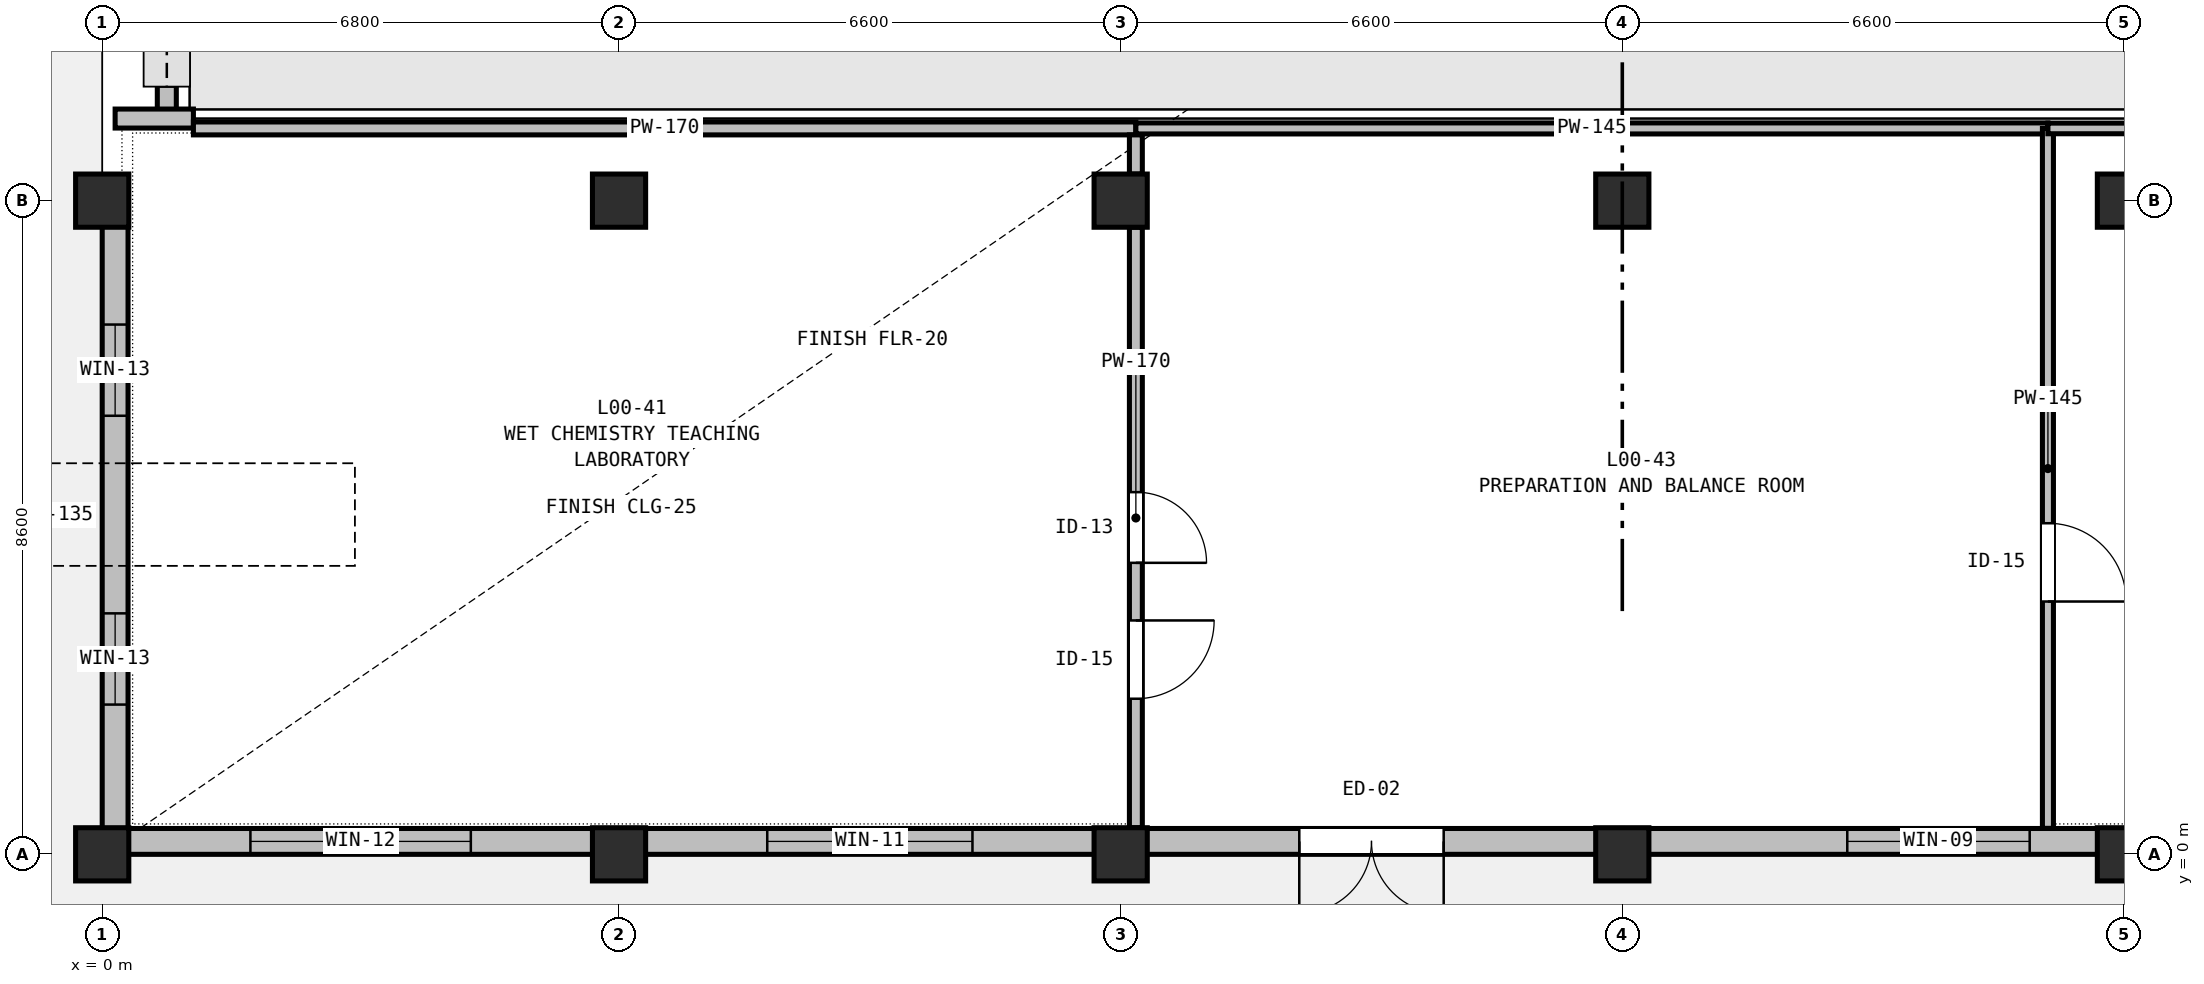
"""IFC4 building model, lengths in metres.
Left out: names, types, materials, properties, quantities, classifications, styles, units other than length and angle.
Written with IfcOpenShell. Run it as: python <this file> out.ifc"""

import sys

from ifc_helpers import new_model, si_unit, direction, frame, frame_2d, origin, origin_2d, place, context, subcontext, project, spatial, rectangle, extrude, element, fill, save


model = new_model("IFC4")
c1 = context("Model", 3, precision=1e-05, world=origin(), true_north=direction((0.0, 1.0)))
c2 = subcontext(c1, "Body", "Model", "MODEL_VIEW")
j1 = project(units=[si_unit("LENGTHUNIT", "METRE"), si_unit("PLANEANGLEUNIT", "RADIAN")], contexts=[c1])
p1 = place(None, origin())
s1 = spatial("IfcSite", under=j1, at=p1, CompositionType="ELEMENT")
p2 = place(p1, origin())
s2 = spatial("IfcBuilding", under=s1, at=p2, CompositionType="ELEMENT")
p3 = place(p2, origin())
s3 = spatial("IfcBuildingStorey", under=s2, at=p3, CompositionType="ELEMENT", Elevation=0.0)
p4 = place(p3, frame((0.0, 0.0, -0.32), z_axis=(0.0, 0.0, 1.0), x_axis=(1.0, 0.0, 0.0)))
e1 = element("IfcColumn", 1, at=p4, inside=s3, PredefinedType="COLUMN", context=c2, shape_type="SweptSolid", body=[
    extrude(rectangle(XDim=0.7, YDim=0.7, at=origin_2d()), origin(), (0.0, 0.0, 1.0), 5.66),
])
p5 = place(p3, frame((0.0, 8.6, -0.32), z_axis=(0.0, 0.0, 1.0), x_axis=(1.0, 0.0, 0.0)))
e2 = element("IfcColumn", 2, at=p5, inside=s3, PredefinedType="COLUMN", context=c2, shape_type="SweptSolid", body=[
    extrude(rectangle(XDim=0.7, YDim=0.7, at=origin_2d()), origin(), (0.0, 0.0, 1.0), 5.72),
])
p6 = place(p3, frame((6.8, 0.0, -0.32), z_axis=(0.0, 0.0, 1.0), x_axis=(1.0, 0.0, 0.0)))
e3 = element("IfcColumn", 3, at=p6, inside=s3, PredefinedType="COLUMN", context=c2, shape_type="SweptSolid", body=[
    extrude(rectangle(XDim=0.7, YDim=0.7, at=origin_2d()), origin(), (0.0, 0.0, 1.0), 5.66),
])
p7 = place(p3, frame((6.8, 8.6, -0.32), z_axis=(0.0, 0.0, 1.0), x_axis=(1.0, 0.0, 0.0)))
e4 = element("IfcColumn", 4, at=p7, inside=s3, PredefinedType="COLUMN", context=c2, shape_type="SweptSolid", body=[
    extrude(rectangle(XDim=0.7, YDim=0.7, at=origin_2d()), origin(), (0.0, 0.0, 1.0), 5.72),
])
p8 = place(p3, frame((13.4, 0.0, -0.32), z_axis=(0.0, 0.0, 1.0), x_axis=(1.0, 0.0, 0.0)))
e5 = element("IfcColumn", 5, at=p8, inside=s3, PredefinedType="COLUMN", context=c2, shape_type="SweptSolid", body=[
    extrude(rectangle(XDim=0.7, YDim=0.7, at=origin_2d()), origin(), (0.0, 0.0, 1.0), 5.66),
])
p9 = place(p3, frame((13.4, 8.6, -0.32), z_axis=(0.0, 0.0, 1.0), x_axis=(1.0, 0.0, 0.0)))
e6 = element("IfcColumn", 6, at=p9, inside=s3, PredefinedType="COLUMN", context=c2, shape_type="SweptSolid", body=[
    extrude(rectangle(XDim=0.7, YDim=0.7, at=origin_2d()), origin(), (0.0, 0.0, 1.0), 5.72),
])
p10 = place(p3, frame((20.0, 0.0, -0.32), z_axis=(0.0, 0.0, 1.0), x_axis=(1.0, 0.0, 0.0)))
e7 = element("IfcColumn", 7, at=p10, inside=s3, PredefinedType="COLUMN", context=c2, shape_type="SweptSolid", body=[
    extrude(rectangle(XDim=0.7, YDim=0.7, at=origin_2d()), origin(), (0.0, 0.0, 1.0), 5.66),
])
p11 = place(p3, frame((20.0, 8.6, -0.32), z_axis=(0.0, 0.0, 1.0), x_axis=(1.0, 0.0, 0.0)))
e8 = element("IfcColumn", 8, at=p11, inside=s3, PredefinedType="COLUMN", context=c2, shape_type="SweptSolid", body=[
    extrude(rectangle(XDim=0.7, YDim=0.7, at=origin_2d()), origin(), (0.0, 0.0, 1.0), 5.72),
])
p12 = place(p3, frame((26.6, 0.0, -0.32), z_axis=(0.0, 0.0, 1.0), x_axis=(1.0, 0.0, 0.0)))
e9 = element("IfcColumn", 9, at=p12, inside=s3, PredefinedType="COLUMN", context=c2, shape_type="SweptSolid", body=[
    extrude(rectangle(XDim=0.7, YDim=0.7, at=origin_2d()), origin(), (0.0, 0.0, 1.0), 5.66),
])
p13 = place(p3, frame((26.6, 8.6, -0.32), z_axis=(0.0, 0.0, 1.0), x_axis=(1.0, 0.0, 0.0)))
e10 = element("IfcColumn", 10, at=p13, inside=s3, PredefinedType="COLUMN", context=c2, shape_type="SweptSolid", body=[
    extrude(rectangle(XDim=0.7, YDim=0.7, at=origin_2d()), origin(), (0.0, 0.0, 1.0), 5.72),
])
p14 = place(p3, frame((26.6, 0.17, 0.0), z_axis=(0.0, 0.0, 1.0), x_axis=(-1.0, 0.0, 0.0)))
e11 = element("IfcWall", 11, at=p14, inside=s3, PredefinedType="STANDARD", context=c2, shape_type="SweptSolid", body=[
    extrude(rectangle(XDim=6.6, YDim=0.34, at=frame_2d((3.3, 0.0))), origin(), (0.0, 0.0, 1.0), 4.535),
])
p15 = place(p14, frame((1.24, 0.0, 0.9)))
e12 = element("IfcOpeningElement", 12, at=p15, cuts=e11, PredefinedType="OPENING", context=c2, shape_type="SweptSolid", body=[
    extrude(rectangle(XDim=2.4, YDim=2.1, at=frame_2d((1.2, 1.05))), frame((0.0, 0.18, 0.0), z_axis=(0.0, -1.0, 0.0), x_axis=(1.0, 0.0, 0.0)), (0.0, 0.0, 1.0), 0.36),
])
p16 = place(p3, frame((20.0, 0.17, 0.0), z_axis=(0.0, 0.0, 1.0), x_axis=(-1.0, 0.0, 0.0)))
e13 = element("IfcWall", 13, at=p16, inside=s3, PredefinedType="STANDARD", context=c2, shape_type="SweptSolid", body=[
    extrude(rectangle(XDim=6.6, YDim=0.34, at=frame_2d((3.3, 0.0))), origin(), (0.0, 0.0, 1.0), 4.535),
])
p17 = place(p16, frame((2.35, 0.0, 0.0)))
e14 = element("IfcOpeningElement", 14, at=p17, cuts=e13, PredefinedType="OPENING", context=c2, shape_type="SweptSolid", body=[
    extrude(rectangle(XDim=1.9, YDim=2.3, at=frame_2d((0.95, 1.15))), frame((0.0, 0.18, 0.0), z_axis=(0.0, -1.0, 0.0), x_axis=(1.0, 0.0, 0.0)), (0.0, 0.0, 1.0), 0.36),
])
p18 = place(p3, frame((13.4, 0.17, 0.0), z_axis=(0.0, 0.0, 1.0), x_axis=(-1.0, 0.0, 0.0)))
e15 = element("IfcWall", 15, at=p18, inside=s3, PredefinedType="STANDARD", context=c2, shape_type="SweptSolid", body=[
    extrude(rectangle(XDim=6.6, YDim=0.34, at=frame_2d((3.3, 0.0))), origin(), (0.0, 0.0, 1.0), 4.535),
])
p19 = place(p18, frame((1.95, 0.0, 0.75)))
e16 = element("IfcOpeningElement", 16, at=p19, cuts=e15, PredefinedType="OPENING", context=c2, shape_type="SweptSolid", body=[
    extrude(rectangle(XDim=2.7, YDim=2.2, at=frame_2d((1.35, 1.1))), frame((0.0, 0.18, 0.0), z_axis=(0.0, -1.0, 0.0), x_axis=(1.0, 0.0, 0.0)), (0.0, 0.0, 1.0), 0.36),
])
p20 = place(p3, frame((6.8, 0.17, 0.0), z_axis=(0.0, 0.0, 1.0), x_axis=(-1.0, 0.0, 0.0)))
e17 = element("IfcWall", 17, at=p20, inside=s3, PredefinedType="STANDARD", context=c2, shape_type="SweptSolid", body=[
    extrude(rectangle(XDim=6.8, YDim=0.34, at=frame_2d((3.4, 0.0))), origin(), (0.0, 0.0, 1.0), 4.535),
])
p21 = place(p20, frame((1.95, 0.0, 0.75)))
e18 = element("IfcOpeningElement", 18, at=p21, cuts=e17, PredefinedType="OPENING", context=c2, shape_type="SweptSolid", body=[
    extrude(rectangle(XDim=2.9, YDim=2.2, at=frame_2d((1.45, 1.1))), frame((0.0, 0.18, 0.0), z_axis=(0.0, -1.0, 0.0), x_axis=(1.0, 0.0, 0.0)), (0.0, 0.0, 1.0), 0.36),
])
p22 = place(p3, frame((0.17, 0.34, 0.0), z_axis=(0.0, 0.0, 1.0), x_axis=(0.0, 1.0, 0.0)))
e19 = element("IfcWall", 19, at=p22, inside=s3, PredefinedType="STANDARD", context=c2, shape_type="SweptSolid", body=[
    extrude(rectangle(XDim=8.26, YDim=0.34, at=frame_2d((4.13, 0.0))), origin(), (0.0, 0.0, 1.0), 4.685),
])
p23 = place(p22, frame((1.63, 0.0, 0.9)))
e20 = element("IfcOpeningElement", 20, at=p23, cuts=e19, PredefinedType="OPENING", context=c2, shape_type="SweptSolid", body=[
    extrude(rectangle(XDim=1.2, YDim=1.5, at=frame_2d((0.6, 0.75))), frame((0.0, 0.18, 0.0), z_axis=(0.0, -1.0, 0.0), x_axis=(1.0, 0.0, 0.0)), (0.0, 0.0, 1.0), 0.36),
])
p24 = place(p22, frame((5.43, 0.0, 0.9)))
e21 = element("IfcOpeningElement", 21, at=p24, cuts=e19, PredefinedType="OPENING", context=c2, shape_type="SweptSolid", body=[
    extrude(rectangle(XDim=1.2, YDim=1.5, at=frame_2d((0.6, 0.75))), frame((0.0, 0.18, 0.0), z_axis=(0.0, -1.0, 0.0), x_axis=(1.0, 0.0, 0.0)), (0.0, 0.0, 1.0), 0.36),
])
p25 = place(p3, frame((0.85, 15.92, 0.0), z_axis=(0.0, 0.0, 1.0), x_axis=(0.0, -1.0, 0.0)))
e22 = element("IfcWall", 22, at=p25, inside=s3, PredefinedType="STANDARD", context=c2, shape_type="SweptSolid", body=[
    extrude(rectangle(XDim=6.24, YDim=0.25, at=frame_2d((3.12, 0.0))), origin(), (0.0, 0.0, 1.0), 4.45),
])
p26 = place(p25, frame((0.42, 0.0, 0.0)))
e23 = element("IfcOpeningElement", 23, at=p26, cuts=e22, PredefinedType="OPENING", context=c2, shape_type="SweptSolid", body=[
    extrude(rectangle(XDim=5.4, YDim=3.8, at=frame_2d((2.7, 1.9))), frame((0.0, 0.135, 0.0), z_axis=(0.0, -1.0, 0.0), x_axis=(1.0, 0.0, 0.0)), (0.0, 0.0, 1.0), 0.27),
])
p27 = place(p3, frame((0.17, 9.68, 0.0), z_axis=(0.0, 0.0, 1.0), x_axis=(1.0, 0.0, 0.0)))
e24 = element("IfcWall", 24, at=p27, inside=s3, PredefinedType="STANDARD", context=c2, shape_type="SweptSolid", body=[
    extrude(rectangle(XDim=1.03, YDim=0.25, at=frame_2d((0.515, 0.0))), origin(), (0.0, 0.0, 1.0), 4.45),
])
p28 = place(p3, frame((1.2, 9.55, 0.0), z_axis=(0.0, 0.0, 1.0), x_axis=(1.0, 0.0, 0.0)))
e25 = element("IfcWall", 25, at=p28, inside=s3, PredefinedType="PARTITIONING", context=c2, shape_type="SweptSolid", body=[
    extrude(rectangle(XDim=12.4, YDim=0.17, at=frame_2d((6.2, 0.0))), origin(), (0.0, 0.0, 1.0), 4.535),
])
p29 = place(p3, frame((13.6, 9.465, 0.0), z_axis=(0.0, 0.0, 1.0), x_axis=(0.0, -1.0, 0.0)))
e26 = element("IfcWall", 26, at=p29, inside=s3, PredefinedType="PARTITIONING", context=c2, shape_type="SweptSolid", body=[
    extrude(rectangle(XDim=0.515, YDim=0.17, at=frame_2d((0.258, 0.0))), origin(), (0.0, 0.0, 1.0), 4.535),
])
p30 = place(p3, frame((13.6, 8.25, 0.0), z_axis=(0.0, 0.0, 1.0), x_axis=(0.0, -1.0, 0.0)))
e27 = element("IfcWall", 27, at=p30, inside=s3, PredefinedType="PARTITIONING", context=c2, shape_type="SweptSolid", body=[
    extrude(rectangle(XDim=7.9, YDim=0.17, at=frame_2d((3.95, 0.0))), origin(), (0.0, 0.0, 1.0), 4.535),
])
p31 = place(p30, frame((3.485, 0.0, 0.0)))
e28 = element("IfcOpeningElement", 28, at=p31, cuts=e27, PredefinedType="OPENING", context=c2, shape_type="SweptSolid", body=[
    extrude(rectangle(XDim=0.93, YDim=2.1, at=frame_2d((0.465, 1.05))), frame((0.0, 0.095, 0.0), z_axis=(0.0, -1.0, 0.0), x_axis=(1.0, 0.0, 0.0)), (0.0, 0.0, 1.0), 0.19),
])
p32 = place(p30, frame((5.173, 0.0, 0.0)))
e29 = element("IfcOpeningElement", 29, at=p32, cuts=e27, PredefinedType="OPENING", context=c2, shape_type="SweptSolid", body=[
    extrude(rectangle(XDim=1.03, YDim=2.1, at=frame_2d((0.515, 1.05))), frame((0.0, 0.095, 0.0), z_axis=(0.0, -1.0, 0.0), x_axis=(1.0, 0.0, 0.0)), (0.0, 0.0, 1.0), 0.19),
])
p33 = place(p3, frame((13.6, 9.55, 0.0), z_axis=(0.0, 0.0, 1.0), x_axis=(1.0, 0.0, 0.0)))
e30 = element("IfcWall", 30, at=p33, inside=s3, PredefinedType="PARTITIONING", context=c2, shape_type="SweptSolid", body=[
    extrude(rectangle(XDim=12.0, YDim=0.145, at=frame_2d((6.0, 0.0))), origin(), (0.0, 0.0, 1.0), 4.535),
])
p34 = place(p3, frame((25.6, 9.55, 0.0), z_axis=(0.0, 0.0, 1.0), x_axis=(0.0, -1.0, 0.0)))
e31 = element("IfcWall", 31, at=p34, inside=s3, PredefinedType="PARTITIONING", context=c2, shape_type="SweptSolid", body=[
    extrude(rectangle(XDim=9.208, YDim=0.145, at=frame_2d((4.604, 0.0))), origin(), (0.0, 0.0, 1.0), 4.735),
])
p35 = place(p34, frame((5.194, 0.0, 0.0)))
e32 = element("IfcOpeningElement", 32, at=p35, cuts=e31, PredefinedType="OPENING", context=c2, shape_type="SweptSolid", body=[
    extrude(rectangle(XDim=1.03, YDim=2.1, at=frame_2d((0.515, 1.05))), frame((0.0, 0.083, 0.0), z_axis=(0.0, -1.0, 0.0), x_axis=(1.0, 0.0, 0.0)), (0.0, 0.0, 1.0), 0.165),
])
p36 = place(p3, frame((25.6, 9.55, 0.0), z_axis=(0.0, 0.0, 1.0), x_axis=(1.0, 0.0, 0.0)))
e33 = element("IfcWall", 33, at=p36, inside=s3, PredefinedType="PARTITIONING", context=c2, shape_type="SweptSolid", body=[
    extrude(rectangle(XDim=7.6, YDim=0.14, at=frame_2d((3.8, 0.0))), origin(), (0.0, 0.0, 1.0), 4.535),
])
p37 = place(p26, origin())
e34 = element("IfcDoor", 34, at=p37, inside=s3, OperationType="ROLLINGUP", PredefinedType="GATE", context=c2, shape_type="SweptSolid", body=[
    extrude(rectangle(XDim=5.4, YDim=3.8, at=frame_2d((2.7, 1.9))), frame((0.0, 0.025, 0.0), z_axis=(0.0, -1.0, 0.0), x_axis=(1.0, 0.0, 0.0)), (0.0, 0.0, 1.0), 0.05),
])
fill(e23, e34)
p38 = place(p17, origin())
e35 = element("IfcDoor", 35, at=p38, inside=s3, OperationType="DOUBLE_DOOR_SINGLE_SWING", PredefinedType="DOOR", context=c2, shape_type="SweptSolid", body=[
    extrude(rectangle(XDim=1.9, YDim=2.3, at=frame_2d((0.95, 1.15))), frame((0.0, 0.025, 0.0), z_axis=(0.0, -1.0, 0.0), x_axis=(1.0, 0.0, 0.0)), (0.0, 0.0, 1.0), 0.05),
])
fill(e14, e35)
p39 = place(p15, origin())
e36 = element("IfcWindow", 36, at=p39, inside=s3, PartitioningType="SINGLE_PANEL", PredefinedType="WINDOW", context=c2, shape_type="SweptSolid", body=[
    extrude(rectangle(XDim=2.4, YDim=2.1, at=frame_2d((1.2, 1.05))), frame((0.0, 0.03, 0.0), z_axis=(0.0, -1.0, 0.0), x_axis=(1.0, 0.0, 0.0)), (0.0, 0.0, 1.0), 0.06),
])
fill(e12, e36)
p40 = place(p19, origin())
e37 = element("IfcWindow", 37, at=p40, inside=s3, PartitioningType="SINGLE_PANEL", PredefinedType="WINDOW", context=c2, shape_type="SweptSolid", body=[
    extrude(rectangle(XDim=2.7, YDim=2.2, at=frame_2d((1.35, 1.1))), frame((0.0, 0.03, 0.0), z_axis=(0.0, -1.0, 0.0), x_axis=(1.0, 0.0, 0.0)), (0.0, 0.0, 1.0), 0.06),
])
fill(e16, e37)
p41 = place(p21, origin())
e38 = element("IfcWindow", 38, at=p41, inside=s3, PartitioningType="SINGLE_PANEL", PredefinedType="WINDOW", context=c2, shape_type="SweptSolid", body=[
    extrude(rectangle(XDim=2.9, YDim=2.2, at=frame_2d((1.45, 1.1))), frame((0.0, 0.03, 0.0), z_axis=(0.0, -1.0, 0.0), x_axis=(1.0, 0.0, 0.0)), (0.0, 0.0, 1.0), 0.06),
])
fill(e18, e38)
p42 = place(p23, origin())
e39 = element("IfcWindow", 39, at=p42, inside=s3, PartitioningType="SINGLE_PANEL", PredefinedType="WINDOW", context=c2, shape_type="SweptSolid", body=[
    extrude(rectangle(XDim=1.2, YDim=1.5, at=frame_2d((0.6, 0.75))), frame((0.0, 0.03, 0.0), z_axis=(0.0, -1.0, 0.0), x_axis=(1.0, 0.0, 0.0)), (0.0, 0.0, 1.0), 0.06),
])
fill(e20, e39)
p43 = place(p24, origin())
e40 = element("IfcWindow", 40, at=p43, inside=s3, PartitioningType="SINGLE_PANEL", PredefinedType="WINDOW", context=c2, shape_type="SweptSolid", body=[
    extrude(rectangle(XDim=1.2, YDim=1.5, at=frame_2d((0.6, 0.75))), frame((0.0, 0.03, 0.0), z_axis=(0.0, -1.0, 0.0), x_axis=(1.0, 0.0, 0.0)), (0.0, 0.0, 1.0), 0.06),
])
fill(e21, e40)
p44 = place(p31, origin())
e41 = element("IfcDoor", 41, at=p44, inside=s3, OperationType="SINGLE_SWING_RIGHT", PredefinedType="DOOR", context=c2, shape_type="SweptSolid", body=[
    extrude(rectangle(XDim=0.93, YDim=2.1, at=frame_2d((0.465, 1.05))), frame((0.0, 0.025, 0.0), z_axis=(0.0, -1.0, 0.0), x_axis=(1.0, 0.0, 0.0)), (0.0, 0.0, 1.0), 0.05),
])
fill(e28, e41)
p45 = place(p35, origin())
e42 = element("IfcDoor", 42, at=p45, inside=s3, OperationType="SINGLE_SWING_RIGHT", PredefinedType="DOOR", context=c2, shape_type="SweptSolid", body=[
    extrude(rectangle(XDim=1.03, YDim=2.1, at=frame_2d((0.515, 1.05))), frame((0.0, 0.025, 0.0), z_axis=(0.0, -1.0, 0.0), x_axis=(1.0, 0.0, 0.0)), (0.0, 0.0, 1.0), 0.05),
])
fill(e32, e42)
p46 = place(p32, origin())
e43 = element("IfcDoor", 43, at=p46, inside=s3, OperationType="SINGLE_SWING_LEFT", PredefinedType="DOOR", context=c2, shape_type="SweptSolid", body=[
    extrude(rectangle(XDim=1.03, YDim=2.1, at=frame_2d((0.515, 1.05))), frame((0.0, 0.025, 0.0), z_axis=(0.0, -1.0, 0.0), x_axis=(1.0, 0.0, 0.0)), (0.0, 0.0, 1.0), 0.05),
])
fill(e29, e43)
save(model, sys.argv[1])
